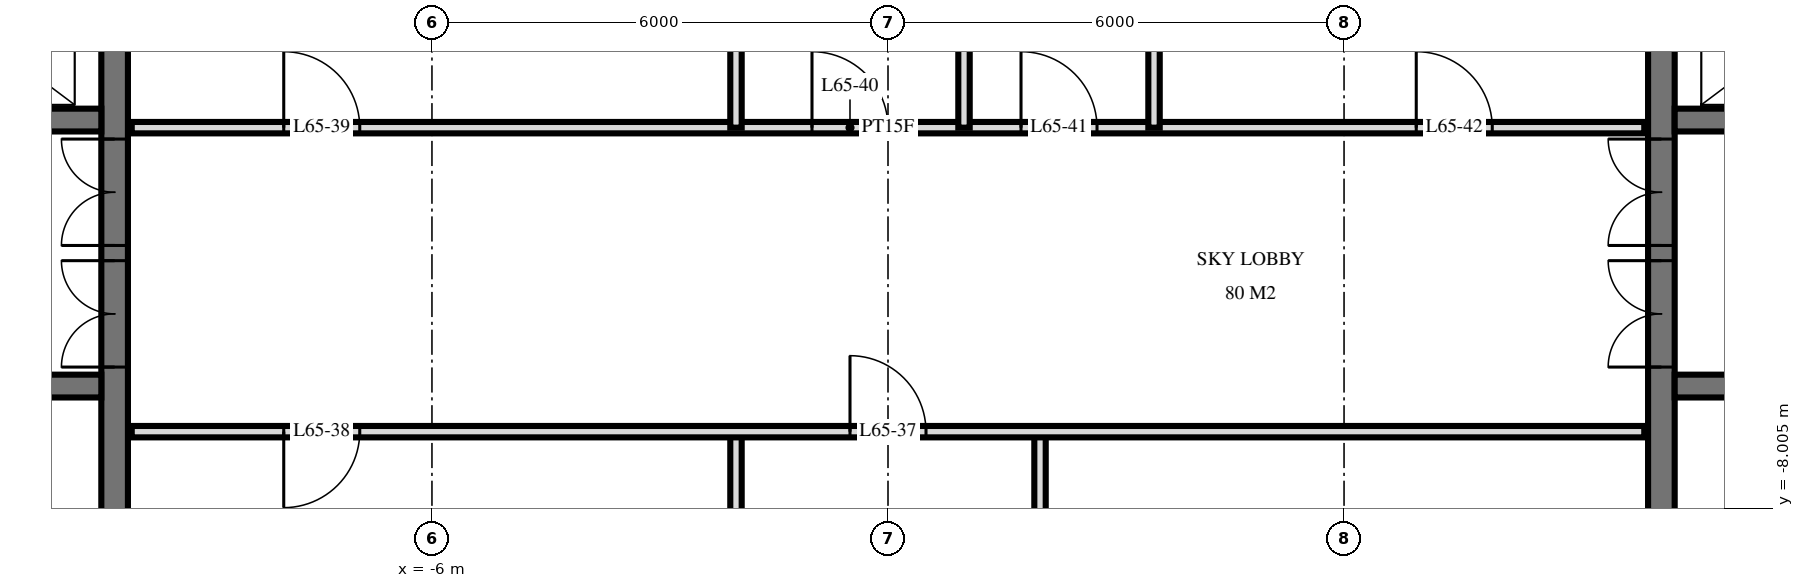
"""IFC4 building model, lengths in metres.
Left out: names, types, materials, properties, quantities, classifications, styles, units other than length and angle.
Written with IfcOpenShell. Run it as: python <this file> out.ifc"""

import sys

from ifc_helpers import new_model, si_unit, direction, frame, frame_2d, origin, place, context, subcontext, project, spatial, rectangle, extrude, element, fill, save


model = new_model("IFC4")
c1 = context("Model", 3, precision=1e-05, world=origin(), true_north=direction((0.0, 1.0)))
c2 = subcontext(c1, "Body", "Model", "MODEL_VIEW")
j1 = project(units=[si_unit("LENGTHUNIT", "METRE"), si_unit("PLANEANGLEUNIT", "RADIAN")], contexts=[c1])
p1 = place(None, origin())
s1 = spatial("IfcSite", under=j1, at=p1, CompositionType="ELEMENT")
p2 = place(p1, origin())
s2 = spatial("IfcBuilding", under=s1, at=p2, CompositionType="ELEMENT")
p3 = place(p2, frame((0.0, 0.0, 246.6)))
s3 = spatial("IfcBuildingStorey", under=s2, at=p3, CompositionType="ELEMENT", Elevation=246.6)
p4 = place(p3, frame((-10.175, -14.55, 0.0), z_axis=(0.0, 0.0, 1.0), x_axis=(0.0, 1.0, 0.0)))
e1 = element("IfcWall", 1, at=p4, inside=s3, PredefinedType="SHEAR", context=c2, shape_type="SweptSolid", body=[
    extrude(rectangle(XDim=14.1, YDim=0.35, at=frame_2d((7.05, 0.0))), origin(), (0.0, 0.0, 1.0), 6.0),
])
p5 = place(p4, frame((8.4, 0.0, 0.0)))
e2 = element("IfcOpeningElement", 2, at=p5, cuts=e1, PredefinedType="OPENING", context=c2, shape_type="SweptSolid", body=[
    extrude(rectangle(XDim=1.4, YDim=2.4, at=frame_2d((0.7, 1.2))), frame((0.0, 0.185, 0.0), z_axis=(0.0, -1.0, 0.0), x_axis=(1.0, 0.0, 0.0)), (0.0, 0.0, 1.0), 0.37),
])
p6 = place(p4, frame((10.0, 0.0, 0.0)))
e3 = element("IfcOpeningElement", 3, at=p6, cuts=e1, PredefinedType="OPENING", context=c2, shape_type="SweptSolid", body=[
    extrude(rectangle(XDim=1.4, YDim=2.4, at=frame_2d((0.7, 1.2))), frame((0.0, 0.185, 0.0), z_axis=(0.0, -1.0, 0.0), x_axis=(1.0, 0.0, 0.0)), (0.0, 0.0, 1.0), 0.37),
])
p7 = place(p4, frame((4.0, 0.0, 0.0)))
e4 = element("IfcOpeningElement", 4, at=p7, cuts=e1, PredefinedType="OPENING", context=c2, shape_type="SweptSolid", body=[
    extrude(rectangle(XDim=1.2, YDim=2.1, at=frame_2d((0.6, 1.05))), frame((0.0, 0.185, 0.0), z_axis=(0.0, -1.0, 0.0), x_axis=(1.0, 0.0, 0.0)), (0.0, 0.0, 1.0), 0.37),
])
p8 = place(p3, frame((-19.05, -2.9, 0.0), z_axis=(0.0, 0.0, 1.0), x_axis=(1.0, 0.0, 0.0)))
e5 = element("IfcWall", 5, at=p8, inside=s3, PredefinedType="SHEAR", context=c2, shape_type="SweptSolid", body=[
    extrude(rectangle(XDim=8.7, YDim=0.3, at=frame_2d((4.35, 0.0))), origin(), (0.0, 0.0, 1.0), 6.0),
])
p9 = place(p8, frame((6.8, 0.0, 0.0)))
e6 = element("IfcOpeningElement", 6, at=p9, cuts=e5, PredefinedType="OPENING", context=c2, shape_type="SweptSolid", body=[
    extrude(rectangle(XDim=1.1, YDim=2.1, at=frame_2d((0.55, 1.05))), frame((0.0, 0.16, 0.0), z_axis=(0.0, -1.0, 0.0), x_axis=(1.0, 0.0, 0.0)), (0.0, 0.0, 1.0), 0.32),
])
p10 = place(p8, frame((3.8, 0.0, 0.0)))
e7 = element("IfcOpeningElement", 7, at=p10, cuts=e5, PredefinedType="OPENING", context=c2, shape_type="SweptSolid", body=[
    extrude(rectangle(XDim=1.1, YDim=2.1, at=frame_2d((0.55, 1.05))), frame((0.0, 0.16, 0.0), z_axis=(0.0, -1.0, 0.0), x_axis=(1.0, 0.0, 0.0)), (0.0, 0.0, 1.0), 0.32),
])
p11 = place(p8, frame((1.613, 0.0, 0.0)))
e8 = element("IfcOpeningElement", 8, at=p11, cuts=e5, PredefinedType="OPENING", context=c2, shape_type="SweptSolid", body=[
    extrude(rectangle(XDim=0.9, YDim=2.1, at=frame_2d((0.45, 1.05))), frame((0.0, 0.16, 0.0), z_axis=(0.0, -1.0, 0.0), x_axis=(1.0, 0.0, 0.0)), (0.0, 0.0, 1.0), 0.32),
])
p12 = place(p8, frame((0.188, 0.0, 0.0)))
e9 = element("IfcOpeningElement", 9, at=p12, cuts=e5, PredefinedType="OPENING", context=c2, shape_type="SweptSolid", body=[
    extrude(rectangle(XDim=0.9, YDim=2.1, at=frame_2d((0.45, 1.05))), frame((0.0, 0.16, 0.0), z_axis=(0.0, -1.0, 0.0), x_axis=(1.0, 0.0, 0.0)), (0.0, 0.0, 1.0), 0.32),
])
p13 = place(p3, frame((-19.05, -6.4, 0.0), z_axis=(0.0, 0.0, 1.0), x_axis=(1.0, 0.0, 0.0)))
e10 = element("IfcWall", 10, at=p13, inside=s3, PredefinedType="SHEAR", context=c2, shape_type="SweptSolid", body=[
    extrude(rectangle(XDim=8.7, YDim=0.3, at=frame_2d((4.35, 0.0))), origin(), (0.0, 0.0, 1.0), 6.0),
])
p14 = place(p13, frame((0.8, 0.0, 0.0)))
e11 = element("IfcOpeningElement", 11, at=p14, cuts=e10, PredefinedType="OPENING", context=c2, shape_type="SweptSolid", body=[
    extrude(rectangle(XDim=1.1, YDim=2.1, at=frame_2d((0.55, 1.05))), frame((0.0, 0.16, 0.0), z_axis=(0.0, -1.0, 0.0), x_axis=(1.0, 0.0, 0.0)), (0.0, 0.0, 1.0), 0.32),
])
p15 = place(p3, frame((10.175, -14.55, 0.0), z_axis=(0.0, 0.0, 1.0), x_axis=(0.0, 1.0, 0.0)))
e12 = element("IfcWall", 12, at=p15, inside=s3, PredefinedType="SHEAR", context=c2, shape_type="SweptSolid", body=[
    extrude(rectangle(XDim=14.1, YDim=0.35, at=frame_2d((7.05, 0.0))), origin(), (0.0, 0.0, 1.0), 6.0),
])
p16 = place(p15, frame((8.4, 0.0, 0.0)))
e13 = element("IfcOpeningElement", 13, at=p16, cuts=e12, PredefinedType="OPENING", context=c2, shape_type="SweptSolid", body=[
    extrude(rectangle(XDim=1.4, YDim=2.4, at=frame_2d((0.7, 1.2))), frame((0.0, 0.185, 0.0), z_axis=(0.0, -1.0, 0.0), x_axis=(1.0, 0.0, 0.0)), (0.0, 0.0, 1.0), 0.37),
])
p17 = place(p15, frame((10.0, 0.0, 0.0)))
e14 = element("IfcOpeningElement", 14, at=p17, cuts=e12, PredefinedType="OPENING", context=c2, shape_type="SweptSolid", body=[
    extrude(rectangle(XDim=1.4, YDim=2.4, at=frame_2d((0.7, 1.2))), frame((0.0, 0.185, 0.0), z_axis=(0.0, -1.0, 0.0), x_axis=(1.0, 0.0, 0.0)), (0.0, 0.0, 1.0), 0.37),
])
p18 = place(p15, frame((4.0, 0.0, 0.0)))
e15 = element("IfcOpeningElement", 15, at=p18, cuts=e12, PredefinedType="OPENING", context=c2, shape_type="SweptSolid", body=[
    extrude(rectangle(XDim=1.2, YDim=2.1, at=frame_2d((0.6, 1.05))), frame((0.0, 0.185, 0.0), z_axis=(0.0, -1.0, 0.0), x_axis=(1.0, 0.0, 0.0)), (0.0, 0.0, 1.0), 0.37),
])
p19 = place(p3, frame((10.35, -2.9, 0.0), z_axis=(0.0, 0.0, 1.0), x_axis=(1.0, 0.0, 0.0)))
e16 = element("IfcWall", 16, at=p19, inside=s3, PredefinedType="SHEAR", context=c2, shape_type="SweptSolid", body=[
    extrude(rectangle(XDim=8.7, YDim=0.3, at=frame_2d((4.35, 0.0))), origin(), (0.0, 0.0, 1.0), 6.0),
])
p20 = place(p19, frame((0.8, 0.0, 0.0)))
e17 = element("IfcOpeningElement", 17, at=p20, cuts=e16, PredefinedType="OPENING", context=c2, shape_type="SweptSolid", body=[
    extrude(rectangle(XDim=1.1, YDim=2.1, at=frame_2d((0.55, 1.05))), frame((0.0, 0.16, 0.0), z_axis=(0.0, -1.0, 0.0), x_axis=(1.0, 0.0, 0.0)), (0.0, 0.0, 1.0), 0.32),
])
p21 = place(p19, frame((3.8, 0.0, 0.0)))
e18 = element("IfcOpeningElement", 18, at=p21, cuts=e16, PredefinedType="OPENING", context=c2, shape_type="SweptSolid", body=[
    extrude(rectangle(XDim=1.1, YDim=2.1, at=frame_2d((0.55, 1.05))), frame((0.0, 0.16, 0.0), z_axis=(0.0, -1.0, 0.0), x_axis=(1.0, 0.0, 0.0)), (0.0, 0.0, 1.0), 0.32),
])
p22 = place(p19, frame((6.188, 0.0, 0.0)))
e19 = element("IfcOpeningElement", 19, at=p22, cuts=e16, PredefinedType="OPENING", context=c2, shape_type="SweptSolid", body=[
    extrude(rectangle(XDim=0.9, YDim=2.1, at=frame_2d((0.45, 1.05))), frame((0.0, 0.16, 0.0), z_axis=(0.0, -1.0, 0.0), x_axis=(1.0, 0.0, 0.0)), (0.0, 0.0, 1.0), 0.32),
])
p23 = place(p19, frame((7.613, 0.0, 0.0)))
e20 = element("IfcOpeningElement", 20, at=p23, cuts=e16, PredefinedType="OPENING", context=c2, shape_type="SweptSolid", body=[
    extrude(rectangle(XDim=0.9, YDim=2.1, at=frame_2d((0.45, 1.05))), frame((0.0, 0.16, 0.0), z_axis=(0.0, -1.0, 0.0), x_axis=(1.0, 0.0, 0.0)), (0.0, 0.0, 1.0), 0.32),
])
p24 = place(p3, frame((10.35, -6.4, 0.0), z_axis=(0.0, 0.0, 1.0), x_axis=(1.0, 0.0, 0.0)))
e21 = element("IfcWall", 21, at=p24, inside=s3, PredefinedType="SHEAR", context=c2, shape_type="SweptSolid", body=[
    extrude(rectangle(XDim=8.7, YDim=0.3, at=frame_2d((4.35, 0.0))), origin(), (0.0, 0.0, 1.0), 6.0),
])
p25 = place(p24, frame((6.8, 0.0, 0.0)))
e22 = element("IfcOpeningElement", 22, at=p25, cuts=e21, PredefinedType="OPENING", context=c2, shape_type="SweptSolid", body=[
    extrude(rectangle(XDim=1.1, YDim=2.1, at=frame_2d((0.55, 1.05))), frame((0.0, 0.16, 0.0), z_axis=(0.0, -1.0, 0.0), x_axis=(1.0, 0.0, 0.0)), (0.0, 0.0, 1.0), 0.32),
])
p26 = place(p3, frame((3.5, -3.0, 0.0), z_axis=(0.0, 0.0, 1.0), x_axis=(0.0, 1.0, 0.0)))
e23 = element("IfcWall", 23, at=p26, inside=s3, PredefinedType="PLUMBINGWALL", context=c2, shape_type="SweptSolid", body=[
    extrude(rectangle(XDim=3.96, YDim=0.15, at=frame_2d((1.98, 0.0))), origin(), (0.0, 0.0, 1.0), 5.7),
])
p27 = place(p3, frame((2.0, -11.0, 0.0), z_axis=(0.0, 0.0, 1.0), x_axis=(0.0, 1.0, 0.0)))
e24 = element("IfcWall", 24, at=p27, inside=s3, PredefinedType="PARTITIONING", context=c2, shape_type="SweptSolid", body=[
    extrude(rectangle(XDim=4.0, YDim=0.15, at=frame_2d((2.0, 0.0))), origin(), (0.0, 0.0, 1.0), 5.7),
])
p28 = place(p3, frame((1.0, -3.0, 0.0), z_axis=(0.0, 0.0, 1.0), x_axis=(0.0, 1.0, 0.0)))
e25 = element("IfcWall", 25, at=p28, inside=s3, PredefinedType="PLUMBINGWALL", context=c2, shape_type="SweptSolid", body=[
    extrude(rectangle(XDim=3.96, YDim=0.15, at=frame_2d((1.98, 0.0))), origin(), (0.0, 0.0, 1.0), 5.7),
])
p29 = place(p3, frame((-2.0, -11.0, 0.0), z_axis=(0.0, 0.0, 1.0), x_axis=(0.0, 1.0, 0.0)))
e26 = element("IfcWall", 26, at=p29, inside=s3, PredefinedType="PARTITIONING", context=c2, shape_type="SweptSolid", body=[
    extrude(rectangle(XDim=4.0, YDim=0.15, at=frame_2d((2.0, 0.0))), origin(), (0.0, 0.0, 1.0), 5.7),
])
p30 = place(p3, frame((-2.0, -3.0, 0.0), z_axis=(0.0, 0.0, 1.0), x_axis=(0.0, 1.0, 0.0)))
e27 = element("IfcWall", 27, at=p30, inside=s3, PredefinedType="PLUMBINGWALL", context=c2, shape_type="SweptSolid", body=[
    extrude(rectangle(XDim=3.96, YDim=0.15, at=frame_2d((1.98, 0.0))), origin(), (0.0, 0.0, 1.0), 5.7),
])
p31 = place(p3, frame((-9.95, -7.0, 0.0), z_axis=(0.0, 0.0, 1.0), x_axis=(1.0, 0.0, 0.0)))
e28 = element("IfcWall", 28, at=p31, inside=s3, PredefinedType="PARTITIONING", context=c2, shape_type="SweptSolid", body=[
    extrude(rectangle(XDim=19.9, YDim=0.15, at=frame_2d((9.95, 0.0))), origin(), (0.0, 0.0, 1.0), 5.7),
])
p32 = place(p31, frame((9.45, 0.0, 0.0)))
e29 = element("IfcOpeningElement", 29, at=p32, cuts=e28, PredefinedType="OPENING", context=c2, shape_type="SweptSolid", body=[
    extrude(rectangle(XDim=1.0, YDim=2.1, at=frame_2d((0.5, 1.05))), frame((0.0, 0.085, 0.0), z_axis=(0.0, -1.0, 0.0), x_axis=(1.0, 0.0, 0.0)), (0.0, 0.0, 1.0), 0.17),
])
p33 = place(p31, frame((2.0, 0.0, 0.0)))
e30 = element("IfcOpeningElement", 30, at=p33, cuts=e28, PredefinedType="OPENING", context=c2, shape_type="SweptSolid", body=[
    extrude(rectangle(XDim=1.0, YDim=2.1, at=frame_2d((0.5, 1.05))), frame((0.0, 0.085, 0.0), z_axis=(0.0, -1.0, 0.0), x_axis=(1.0, 0.0, 0.0)), (0.0, 0.0, 1.0), 0.17),
])
p34 = place(p3, frame((-9.95, -3.0, 0.0), z_axis=(0.0, 0.0, 1.0), x_axis=(1.0, 0.0, 0.0)))
e31 = element("IfcWall", 31, at=p34, inside=s3, PredefinedType="PARTITIONING", context=c2, shape_type="SweptSolid", body=[
    extrude(rectangle(XDim=19.9, YDim=0.15, at=frame_2d((9.95, 0.0))), origin(), (0.0, 0.0, 1.0), 5.7),
])
p35 = place(p34, frame((2.0, 0.0, 0.0)))
e32 = element("IfcOpeningElement", 32, at=p35, cuts=e31, PredefinedType="OPENING", context=c2, shape_type="SweptSolid", body=[
    extrude(rectangle(XDim=1.0, YDim=2.1, at=frame_2d((0.5, 1.05))), frame((0.0, 0.085, 0.0), z_axis=(0.0, -1.0, 0.0), x_axis=(1.0, 0.0, 0.0)), (0.0, 0.0, 1.0), 0.17),
])
p36 = place(p34, frame((8.95, 0.0, 0.0)))
e33 = element("IfcOpeningElement", 33, at=p36, cuts=e31, PredefinedType="OPENING", context=c2, shape_type="SweptSolid", body=[
    extrude(rectangle(XDim=1.0, YDim=2.1, at=frame_2d((0.5, 1.05))), frame((0.0, 0.085, 0.0), z_axis=(0.0, -1.0, 0.0), x_axis=(1.0, 0.0, 0.0)), (0.0, 0.0, 1.0), 0.17),
])
p37 = place(p34, frame((11.7, 0.0, 0.0)))
e34 = element("IfcOpeningElement", 34, at=p37, cuts=e31, PredefinedType="OPENING", context=c2, shape_type="SweptSolid", body=[
    extrude(rectangle(XDim=1.0, YDim=2.1, at=frame_2d((0.5, 1.05))), frame((0.0, 0.085, 0.0), z_axis=(0.0, -1.0, 0.0), x_axis=(1.0, 0.0, 0.0)), (0.0, 0.0, 1.0), 0.17),
])
p38 = place(p34, frame((16.9, 0.0, 0.0)))
e35 = element("IfcOpeningElement", 35, at=p38, cuts=e31, PredefinedType="OPENING", context=c2, shape_type="SweptSolid", body=[
    extrude(rectangle(XDim=1.0, YDim=2.1, at=frame_2d((0.5, 1.05))), frame((0.0, 0.085, 0.0), z_axis=(0.0, -1.0, 0.0), x_axis=(1.0, 0.0, 0.0)), (0.0, 0.0, 1.0), 0.17),
])
p39 = place(p5, origin())
e36 = element("IfcDoor", 36, at=p39, inside=s3, OperationType="DOUBLE_DOOR_SINGLE_SWING", PredefinedType="DOOR", context=c2, shape_type="SweptSolid", body=[
    extrude(rectangle(XDim=1.4, YDim=2.4, at=frame_2d((0.7, 1.2))), frame((0.0, 0.025, 0.0), z_axis=(0.0, -1.0, 0.0), x_axis=(1.0, 0.0, 0.0)), (0.0, 0.0, 1.0), 0.05),
])
fill(e2, e36)
p40 = place(p6, origin())
e37 = element("IfcDoor", 37, at=p40, inside=s3, OperationType="DOUBLE_DOOR_SINGLE_SWING", PredefinedType="DOOR", context=c2, shape_type="SweptSolid", body=[
    extrude(rectangle(XDim=1.4, YDim=2.4, at=frame_2d((0.7, 1.2))), frame((0.0, 0.025, 0.0), z_axis=(0.0, -1.0, 0.0), x_axis=(1.0, 0.0, 0.0)), (0.0, 0.0, 1.0), 0.05),
])
fill(e3, e37)
p41 = place(p16, origin())
e38 = element("IfcDoor", 38, at=p41, inside=s3, OperationType="DOUBLE_DOOR_SINGLE_SWING", PredefinedType="DOOR", context=c2, shape_type="SweptSolid", body=[
    extrude(rectangle(XDim=1.4, YDim=2.4, at=frame_2d((0.7, 1.2))), frame((0.0, 0.025, 0.0), z_axis=(0.0, -1.0, 0.0), x_axis=(1.0, 0.0, 0.0)), (0.0, 0.0, 1.0), 0.05),
])
fill(e13, e38)
p42 = place(p17, origin())
e39 = element("IfcDoor", 39, at=p42, inside=s3, OperationType="DOUBLE_DOOR_SINGLE_SWING", PredefinedType="DOOR", context=c2, shape_type="SweptSolid", body=[
    extrude(rectangle(XDim=1.4, YDim=2.4, at=frame_2d((0.7, 1.2))), frame((0.0, 0.025, 0.0), z_axis=(0.0, -1.0, 0.0), x_axis=(1.0, 0.0, 0.0)), (0.0, 0.0, 1.0), 0.05),
])
fill(e14, e39)
p43 = place(p32, origin())
e40 = element("IfcDoor", 40, at=p43, inside=s3, OperationType="SINGLE_SWING_RIGHT", PredefinedType="DOOR", context=c2, shape_type="SweptSolid", body=[
    extrude(rectangle(XDim=1.0, YDim=2.1, at=frame_2d((0.5, 1.05))), frame((0.0, 0.025, 0.0), z_axis=(0.0, -1.0, 0.0), x_axis=(1.0, 0.0, 0.0)), (0.0, 0.0, 1.0), 0.05),
])
fill(e29, e40)
p44 = place(p33, frame((0.5, 0.0, 0.0), z_axis=(0.0, 0.0, 1.0), x_axis=(-1.0, 0.0, 0.0)))
e41 = element("IfcDoor", 41, at=p44, inside=s3, OperationType="SINGLE_SWING_LEFT", PredefinedType="DOOR", context=c2, shape_type="SweptSolid", body=[
    extrude(rectangle(XDim=1.0, YDim=2.1, at=frame_2d((0.0, 1.05))), frame((0.0, -0.025, 0.0), z_axis=(0.0, 1.0, 0.0), x_axis=(-1.0, 0.0, 0.0)), (0.0, 0.0, 1.0), 0.05),
])
fill(e30, e41)
p45 = place(p35, origin())
e42 = element("IfcDoor", 42, at=p45, inside=s3, OperationType="SINGLE_SWING_RIGHT", PredefinedType="DOOR", context=c2, shape_type="SweptSolid", body=[
    extrude(rectangle(XDim=1.0, YDim=2.1, at=frame_2d((0.5, 1.05))), frame((0.0, 0.025, 0.0), z_axis=(0.0, -1.0, 0.0), x_axis=(1.0, 0.0, 0.0)), (0.0, 0.0, 1.0), 0.05),
])
fill(e32, e42)
p46 = place(p36, origin())
e43 = element("IfcDoor", 43, at=p46, inside=s3, OperationType="SINGLE_SWING_RIGHT", PredefinedType="DOOR", context=c2, shape_type="SweptSolid", body=[
    extrude(rectangle(XDim=1.0, YDim=2.1, at=frame_2d((0.5, 1.05))), frame((0.0, 0.025, 0.0), z_axis=(0.0, -1.0, 0.0), x_axis=(1.0, 0.0, 0.0)), (0.0, 0.0, 1.0), 0.05),
])
fill(e33, e43)
p47 = place(p37, origin())
e44 = element("IfcDoor", 44, at=p47, inside=s3, OperationType="SINGLE_SWING_RIGHT", PredefinedType="DOOR", context=c2, shape_type="SweptSolid", body=[
    extrude(rectangle(XDim=1.0, YDim=2.1, at=frame_2d((0.5, 1.05))), frame((0.0, 0.025, 0.0), z_axis=(0.0, -1.0, 0.0), x_axis=(1.0, 0.0, 0.0)), (0.0, 0.0, 1.0), 0.05),
])
fill(e34, e44)
p48 = place(p38, origin())
e45 = element("IfcDoor", 45, at=p48, inside=s3, OperationType="SINGLE_SWING_RIGHT", PredefinedType="DOOR", context=c2, shape_type="SweptSolid", body=[
    extrude(rectangle(XDim=1.0, YDim=2.1, at=frame_2d((0.5, 1.05))), frame((0.0, 0.025, 0.0), z_axis=(0.0, -1.0, 0.0), x_axis=(1.0, 0.0, 0.0)), (0.0, 0.0, 1.0), 0.05),
])
fill(e35, e45)
save(model, sys.argv[1])
